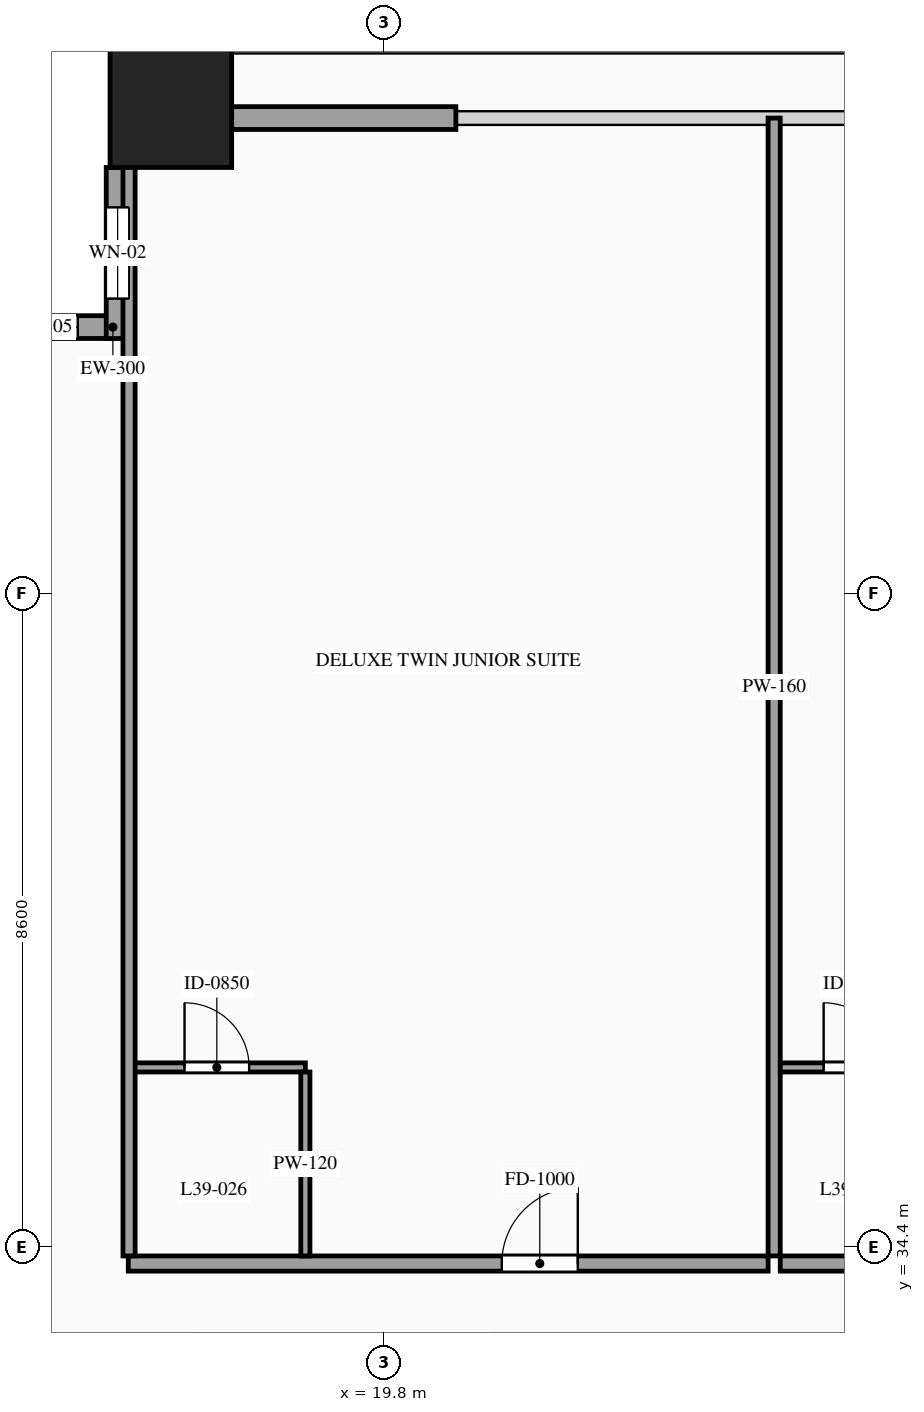
"""IFC4 building model, lengths in metres.
Left out: names, types, materials, properties, quantities, classifications, styles, units other than length and angle.
Written with IfcOpenShell. Run it as: python <this file> out.ifc"""

import sys

from ifc_helpers import new_model, si_unit, direction, frame, frame_2d, origin, origin_2d, place, context, subcontext, project, spatial, rectangle, hollow_rectangle, extrude, source, transform, mapped, element, fill, save


model = new_model("IFC4")
c1 = context("Model", 3, precision=1e-05, world=origin(), true_north=direction((0.0, 1.0)))
c2 = subcontext(c1, "Body", "Model", "MODEL_VIEW")
j1 = project(units=[si_unit("LENGTHUNIT", "METRE"), si_unit("PLANEANGLEUNIT", "RADIAN")], contexts=[c1])
p1 = place(None, origin())
s1 = spatial("IfcSite", under=j1, at=p1, CompositionType="ELEMENT")
p2 = place(p1, origin())
s2 = spatial("IfcBuilding", under=s1, at=p2, CompositionType="ELEMENT")
p3 = place(p2, frame((0.0, 0.0, 148.8)))
s3 = spatial("IfcBuildingStorey", under=s2, at=p3, CompositionType="ELEMENT", Elevation=148.8)
m1 = source(origin(), c2, "Body", "SweptSolid", [
    extrude(hollow_rectangle(XDim=1.6, YDim=1.6, WallThickness=0.07, at=origin_2d()), origin(), (0.0, 0.0, 1.0), 3.6),
])
p4 = place(p3, frame((17.0, 49.4, 0.0), z_axis=(0.0, 0.0, 1.0), x_axis=(1.0, 0.0, 0.0)))
e1 = element("IfcColumn", 1, at=p4, inside=s3, PredefinedType="COLUMN", context=c2, shape_type="MappedRepresentation", body=[
    mapped(m1, transform((0.0, 0.0, 0.0), scale=1.0)),
])
p5 = place(p3, frame((16.45, 46.5, 0.0), z_axis=(0.0, 0.0, 1.0), x_axis=(-1.0, 0.0, 0.0)))
e2 = element("IfcWall", 2, at=p5, inside=s3, PredefinedType="SOLIDWALL", context=c2, shape_type="SweptSolid", body=[
    extrude(rectangle(XDim=2.25, YDim=0.3, at=frame_2d((1.125, 0.0))), origin(), (0.0, 0.0, 1.0), 3.38),
])
p6 = place(p5, frame((0.675, 0.0, 0.85)))
e3 = element("IfcOpeningElement", 3, at=p6, cuts=e2, PredefinedType="OPENING", context=c2, shape_type="SweptSolid", body=[
    extrude(rectangle(XDim=0.9, YDim=1.5, at=frame_2d((0.45, 0.75))), frame((0.0, 0.165, 0.0), z_axis=(0.0, -1.0, 0.0), x_axis=(1.0, 0.0, 0.0)), (0.0, 0.0, 1.0), 0.33),
])
p7 = place(p3, frame((16.3, 48.6, 0.0), z_axis=(0.0, 0.0, 1.0), x_axis=(0.0, -1.0, 0.0)))
e4 = element("IfcWall", 4, at=p7, inside=s3, PredefinedType="SOLIDWALL", context=c2, shape_type="SweptSolid", body=[
    extrude(rectangle(XDim=2.25, YDim=0.3, at=frame_2d((1.125, 0.0))), origin(), (0.0, 0.0, 1.0), 3.38),
])
p8 = place(p7, frame((0.525, 0.0, 0.85)))
e5 = element("IfcOpeningElement", 5, at=p8, cuts=e4, PredefinedType="OPENING", context=c2, shape_type="SweptSolid", body=[
    extrude(rectangle(XDim=1.2, YDim=2.1, at=frame_2d((0.6, 1.05))), frame((0.0, 0.165, 0.0), z_axis=(0.0, -1.0, 0.0), x_axis=(1.0, 0.0, 0.0)), (0.0, 0.0, 1.0), 0.33),
])
m2 = source(origin(), c2, "Body", "SweptSolid", [
    extrude(rectangle(XDim=2.95, YDim=0.3, at=frame_2d((1.475, 0.0))), origin(), (0.0, 0.0, 1.0), 2.775),
])
p9 = place(p3, frame((17.8, 49.25, 0.0), z_axis=(0.0, 0.0, 1.0), x_axis=(1.0, 0.0, 0.0)))
e6 = element("IfcWall", 6, at=p9, inside=s3, PredefinedType="SOLIDWALL", context=c2, shape_type="MappedRepresentation", body=[
    mapped(m2, transform((0.0, 0.0, 0.0), scale=1.0)),
])
p10 = place(p3, frame((16.44, 34.18, 0.0), z_axis=(0.0, 0.0, 1.0), x_axis=(1.0, 0.0, 0.0)))
e7 = element("IfcWall", 7, at=p10, inside=s3, PredefinedType="PARTITIONING", context=c2, shape_type="SweptSolid", body=[
    extrude(rectangle(XDim=8.418, YDim=0.2, at=frame_2d((4.209, 0.0))), origin(), (0.0, 0.0, 1.0), 3.38),
])
p11 = place(p10, frame((4.914, 0.0, 0.0)))
e8 = element("IfcOpeningElement", 8, at=p11, cuts=e7, PredefinedType="OPENING", context=c2, shape_type="SweptSolid", body=[
    extrude(rectangle(XDim=1.0, YDim=2.2, at=frame_2d((0.5, 1.1))), frame((0.0, 0.115, 0.0), z_axis=(0.0, -1.0, 0.0), x_axis=(1.0, 0.0, 0.0)), (0.0, 0.0, 1.0), 0.23),
])
m3 = source(origin(), c2, "Body", "SweptSolid", [
    extrude(rectangle(XDim=14.97, YDim=0.16, at=frame_2d((7.485, 0.0))), origin(), (0.0, 0.0, 1.0), 3.38),
])
p12 = place(p3, frame((24.938, 34.28, 0.0), z_axis=(0.0, 0.0, 1.0), x_axis=(0.0, 1.0, 0.0)))
e9 = element("IfcWall", 9, at=p12, inside=s3, PredefinedType="PARTITIONING", context=c2, shape_type="MappedRepresentation", body=[
    mapped(m3, transform((0.0, 0.0, 0.0), scale=1.0)),
])
p13 = place(p3, frame((16.44, 36.76, 0.0), z_axis=(0.0, 0.0, 1.0), x_axis=(1.0, 0.0, 0.0)))
e10 = element("IfcWall", 10, at=p13, inside=s3, PredefinedType="PARTITIONING", context=c2, shape_type="SweptSolid", body=[
    extrude(rectangle(XDim=2.33, YDim=0.12, at=frame_2d((1.165, 0.0))), origin(), (0.0, 0.0, 1.0), 3.38),
])
p14 = place(p13, frame((0.74, 0.0, 0.0)))
e11 = element("IfcOpeningElement", 11, at=p14, cuts=e10, PredefinedType="OPENING", context=c2, shape_type="SweptSolid", body=[
    extrude(rectangle(XDim=0.85, YDim=2.1, at=frame_2d((0.425, 1.05))), frame((0.0, 0.075, 0.0), z_axis=(0.0, -1.0, 0.0), x_axis=(1.0, 0.0, 0.0)), (0.0, 0.0, 1.0), 0.15),
])
m4 = source(origin(), c2, "Body", "SweptSolid", [
    extrude(rectangle(XDim=2.42, YDim=0.12, at=frame_2d((1.21, 0.0))), origin(), (0.0, 0.0, 1.0), 3.38),
])
p15 = place(p3, frame((18.77, 34.28, 0.0), z_axis=(0.0, 0.0, 1.0), x_axis=(0.0, 1.0, 0.0)))
e12 = element("IfcWall", 12, at=p15, inside=s3, PredefinedType="PARTITIONING", context=c2, shape_type="MappedRepresentation", body=[
    mapped(m4, transform((0.0, 0.0, 0.0), scale=1.0)),
])
p16 = place(p3, frame((25.018, 34.18, 0.0), z_axis=(0.0, 0.0, 1.0), x_axis=(1.0, 0.0, 0.0)))
e13 = element("IfcWall", 13, at=p16, inside=s3, PredefinedType="PARTITIONING", context=c2, shape_type="SweptSolid", body=[
    extrude(rectangle(XDim=4.062, YDim=0.2, at=frame_2d((2.031, 0.0))), origin(), (0.0, 0.0, 1.0), 3.38),
])
p17 = place(p16, frame((2.567, 0.0, 0.0)))
e14 = element("IfcOpeningElement", 14, at=p17, cuts=e13, PredefinedType="OPENING", context=c2, shape_type="SweptSolid", body=[
    extrude(rectangle(XDim=1.0, YDim=2.2, at=frame_2d((0.5, 1.1))), frame((0.0, 0.115, 0.0), z_axis=(0.0, -1.0, 0.0), x_axis=(1.0, 0.0, 0.0)), (0.0, 0.0, 1.0), 0.23),
])
p18 = place(p3, frame((25.018, 36.76, 0.0), z_axis=(0.0, 0.0, 1.0), x_axis=(1.0, 0.0, 0.0)))
e15 = element("IfcWall", 15, at=p18, inside=s3, PredefinedType="PARTITIONING", context=c2, shape_type="SweptSolid", body=[
    extrude(rectangle(XDim=1.992, YDim=0.12, at=frame_2d((0.996, 0.0))), origin(), (0.0, 0.0, 1.0), 3.38),
])
p19 = place(p18, frame((0.571, 0.0, 0.0)))
e16 = element("IfcOpeningElement", 16, at=p19, cuts=e15, PredefinedType="OPENING", context=c2, shape_type="SweptSolid", body=[
    extrude(rectangle(XDim=0.85, YDim=2.1, at=frame_2d((0.425, 1.05))), frame((0.0, 0.075, 0.0), z_axis=(0.0, -1.0, 0.0), x_axis=(1.0, 0.0, 0.0)), (0.0, 0.0, 1.0), 0.15),
])
m5 = source(origin(), c2, "Body", "SweptSolid", [
    extrude(rectangle(XDim=14.82, YDim=0.16, at=frame_2d((7.41, 0.0))), origin(), (0.0, 0.0, 1.0), 3.38),
])
p20 = place(p3, frame((16.45, 34.28, 0.0), z_axis=(0.0, 0.0, 1.0), x_axis=(0.0, 1.0, 0.0)))
e17 = element("IfcWall", 17, at=p20, inside=s3, PredefinedType="PARTITIONING", context=c2, shape_type="MappedRepresentation", body=[
    mapped(m5, transform((0.0, 0.0, 0.0), scale=1.0)),
])
m6 = source(origin(), c2, "Body", "SweptSolid", [
    extrude(rectangle(XDim=0.9, YDim=1.5, at=frame_2d((0.45, 0.75))), frame((0.0, 0.03, 0.0), z_axis=(0.0, -1.0, 0.0), x_axis=(1.0, 0.0, 0.0)), (0.0, 0.0, 1.0), 0.06),
])
p21 = place(p6, origin())
e18 = element("IfcWindow", 18, at=p21, inside=s3, PartitioningType="SINGLE_PANEL", PredefinedType="WINDOW", context=c2, shape_type="MappedRepresentation", body=[
    mapped(m6, transform((0.0, 0.0, 0.0), scale=1.0)),
])
fill(e3, e18)
m7 = source(origin(), c2, "Body", "SweptSolid", [
    extrude(rectangle(XDim=1.2, YDim=2.1, at=frame_2d((0.6, 1.05))), frame((0.0, 0.03, 0.0), z_axis=(0.0, -1.0, 0.0), x_axis=(1.0, 0.0, 0.0)), (0.0, 0.0, 1.0), 0.06),
])
p22 = place(p8, origin())
e19 = element("IfcWindow", 19, at=p22, inside=s3, PartitioningType="SINGLE_PANEL", PredefinedType="WINDOW", context=c2, shape_type="MappedRepresentation", body=[
    mapped(m7, transform((0.0, 0.0, 0.0), scale=1.0)),
])
fill(e5, e19)
m8 = source(origin(), c2, "Body", "SweptSolid", [
    extrude(rectangle(XDim=1.0, YDim=2.2, at=frame_2d((0.5, 1.1))), frame((0.0, 0.025, 0.0), z_axis=(0.0, -1.0, 0.0), x_axis=(1.0, 0.0, 0.0)), (0.0, 0.0, 1.0), 0.05),
])
p23 = place(p11, origin())
e20 = element("IfcDoor", 20, at=p23, inside=s3, OperationType="SINGLE_SWING_RIGHT", PredefinedType="DOOR", context=c2, shape_type="MappedRepresentation", body=[
    mapped(m8, transform((0.0, 0.0, 0.0), scale=1.0)),
])
fill(e8, e20)
m9 = source(origin(), c2, "Body", "SweptSolid", [
    extrude(rectangle(XDim=0.85, YDim=2.1, at=frame_2d((0.425, 1.05))), frame((0.0, 0.025, 0.0), z_axis=(0.0, -1.0, 0.0), x_axis=(1.0, 0.0, 0.0)), (0.0, 0.0, 1.0), 0.05),
])
p24 = place(p14, origin())
e21 = element("IfcDoor", 21, at=p24, inside=s3, OperationType="SINGLE_SWING_LEFT", PredefinedType="DOOR", context=c2, shape_type="MappedRepresentation", body=[
    mapped(m9, transform((0.0, 0.0, 0.0), scale=1.0)),
])
fill(e11, e21)
p25 = place(p19, origin())
e22 = element("IfcDoor", 22, at=p25, inside=s3, OperationType="SINGLE_SWING_LEFT", PredefinedType="DOOR", context=c2, shape_type="MappedRepresentation", body=[
    mapped(m9, transform((0.0, 0.0, 0.0), scale=1.0)),
])
fill(e16, e22)
save(model, sys.argv[1])
